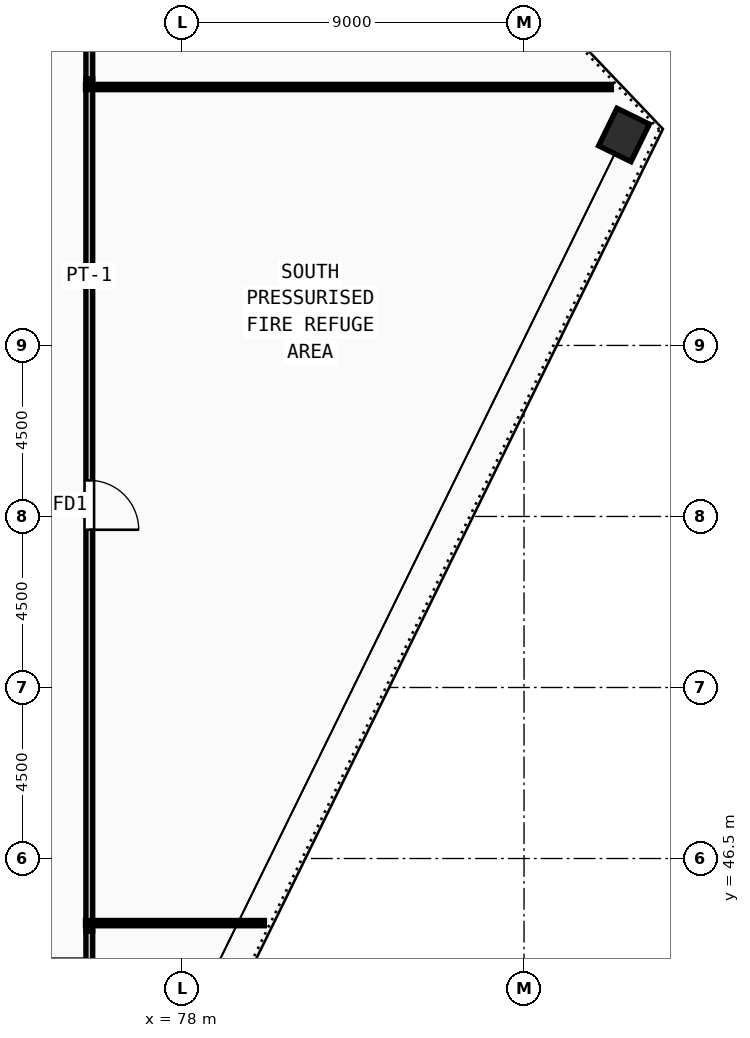
"""IFC4 building model, lengths in metres.
Left out: names, types, materials, properties, quantities, classifications, styles, units other than length and angle.
Written with IfcOpenShell. Run it as: python <this file> out.ifc"""

import sys

from ifc_helpers import new_model, si_unit, direction, frame, frame_2d, origin, origin_2d, place, context, subcontext, project, spatial, rectangle, extrude, source, transform, mapped, element, fill, save


model = new_model("IFC4")
c1 = context("Model", 3, precision=1e-05, world=origin(), true_north=direction((0.0, 1.0)))
c2 = subcontext(c1, "Body", "Model", "MODEL_VIEW")
j1 = project(units=[si_unit("LENGTHUNIT", "METRE"), si_unit("PLANEANGLEUNIT", "RADIAN")], contexts=[c1])
p1 = place(None, origin())
s1 = spatial("IfcSite", under=j1, at=p1, CompositionType="ELEMENT")
p2 = place(p1, origin())
s2 = spatial("IfcBuilding", under=s1, at=p2, CompositionType="ELEMENT")
p3 = place(p2, frame((0.0, 0.0, 324.0)))
s3 = spatial("IfcBuildingStorey", under=s2, at=p3, CompositionType="ELEMENT", Elevation=324.0)
m1 = source(origin(), c2, "Body", "SweptSolid", [
    extrude(rectangle(XDim=1.1, YDim=0.95, at=origin_2d()), origin(), (0.0, 0.0, 1.0), 4.5),
])
p4 = place(p3, frame((89.63, 65.538, 0.0), z_axis=(0.0, 0.0, 1.0), x_axis=(0.440095898534, 0.897950778213, 0.0)))
e1 = element("IfcColumn", 1, at=p4, inside=s3, PredefinedType="COLUMN", context=c2, shape_type="MappedRepresentation", body=[
    mapped(m1, transform((0.0, 0.0, 0.0), x_axis=(1.0, 0.0, 0.0), y_axis=(0.0, 1.0, 0.0), z_axis=(0.0, 0.0, 1.0), scale=1.0)),
])
p5 = place(p3, frame((75.56, 67.015, 0.0), z_axis=(0.0, 0.0, 1.0), x_axis=(0.0, -1.0, 0.0)))
e2 = element("IfcWall", 2, at=p5, inside=s3, PredefinedType="PARTITIONING", context=c2, shape_type="SweptSolid", body=[
    extrude(rectangle(XDim=22.43, YDim=0.18, at=frame_2d((11.215, 0.0))), origin(), (0.0, 0.0, 1.0), 4.32),
])
m2 = source(origin(), c2, "Body", "SweptSolid", [
    extrude(rectangle(XDim=1.3, YDim=2.2, at=frame_2d((0.65, 1.1))), frame((0.0, 0.1, 0.0), z_axis=(0.0, -1.0, 0.0), x_axis=(1.0, 0.0, 0.0)), (0.0, 0.0, 1.0), 0.2),
])
p6 = place(p5, frame((10.565, 0.0, 0.0)))
e3 = element("IfcOpeningElement", 3, at=p6, cuts=e2, PredefinedType="OPENING", context=c2, shape_type="MappedRepresentation", body=[
    mapped(m2, transform((0.0, 0.0, 0.0), x_axis=(1.0, 0.0, 0.0), y_axis=(0.0, 1.0, 0.0), z_axis=(0.0, 0.0, 1.0), scale=1.0)),
])
p7 = place(p3, frame((75.56, 67.98, 0.0), z_axis=(0.0, 0.0, 1.0), x_axis=(0.0, -1.0, 0.0)))
e4 = element("IfcWall", 4, at=p7, inside=s3, PredefinedType="PARTITIONING", context=c2, shape_type="SweptSolid", body=[
    extrude(rectangle(XDim=0.965, YDim=0.18, at=frame_2d((0.482, 0.0))), origin(), (0.0, 0.0, 1.0), 4.32),
])
p8 = place(p3, frame((75.56, 44.585, 0.0), z_axis=(0.0, 0.0, 1.0), x_axis=(0.0, -1.0, 0.0)))
e5 = element("IfcWall", 5, at=p8, inside=s3, PredefinedType="PARTITIONING", context=c2, shape_type="SweptSolid", body=[
    extrude(rectangle(XDim=0.915, YDim=0.18, at=frame_2d((0.458, 0.0))), origin(), (0.0, 0.0, 1.0), 4.32),
])
p9 = place(p3, frame((75.46, 44.8, 0.0), z_axis=(0.0, 0.0, 1.0), x_axis=(1.0, 0.0, 0.0)))
e6 = element("IfcWall", 6, at=p9, inside=s3, PredefinedType="PARTITIONING", context=c2, shape_type="SweptSolid", body=[
    extrude(rectangle(XDim=4.708, YDim=0.14, at=frame_2d((2.354, 0.0))), origin(), (0.0, 0.0, 1.0), 4.32),
])
p10 = place(p3, frame((75.46, 66.8, 0.0), z_axis=(0.0, 0.0, 1.0), x_axis=(1.0, 0.0, 0.0)))
e7 = element("IfcWall", 7, at=p10, inside=s3, PredefinedType="PARTITIONING", context=c2, shape_type="SweptSolid", body=[
    extrude(rectangle(XDim=13.839, YDim=0.14, at=frame_2d((6.919, 0.0))), origin(), (0.0, 0.0, 1.0), 4.32),
])
m3 = source(origin(), c2, "Body", "SweptSolid", [
    extrude(rectangle(XDim=1.3, YDim=2.2, at=frame_2d((0.65, 1.1))), frame((0.0, 0.025, 0.0), z_axis=(0.0, -1.0, 0.0), x_axis=(1.0, 0.0, 0.0)), (0.0, 0.0, 1.0), 0.05),
])
p11 = place(p6, origin())
e8 = element("IfcDoor", 8, at=p11, inside=s3, OperationType="SINGLE_SWING_RIGHT", PredefinedType="DOOR", context=c2, shape_type="MappedRepresentation", body=[
    mapped(m3, transform((0.0, 0.0, 0.0), x_axis=(1.0, 0.0, 0.0), y_axis=(0.0, 1.0, 0.0), z_axis=(0.0, 0.0, 1.0), scale=1.0)),
])
fill(e3, e8)
save(model, sys.argv[1])
